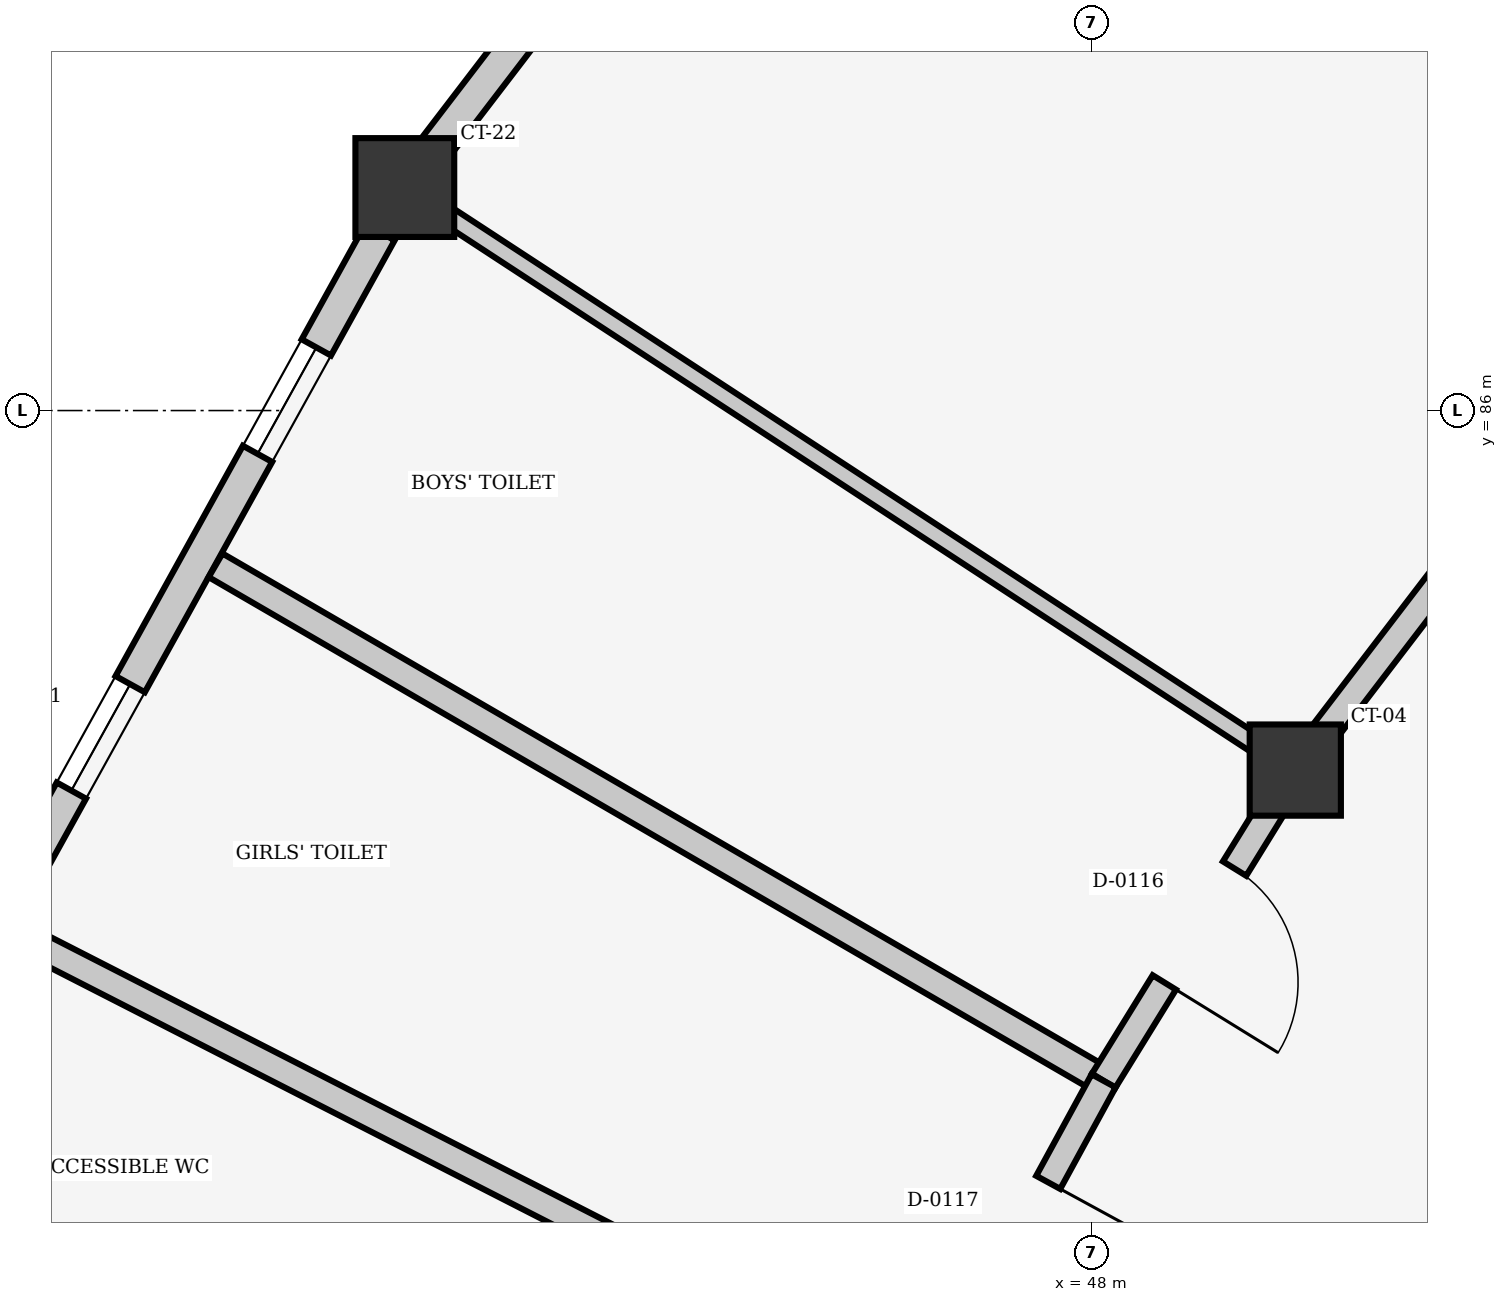
"""IFC4 building model, lengths in metres.
Left out: names, types, materials, properties, quantities, classifications, styles, units other than length and angle.
Written with IfcOpenShell. Run it as: python <this file> out.ifc"""

import sys

from ifc_helpers import new_model, si_unit, direction, frame, frame_2d, origin, origin_2d, place, context, subcontext, project, spatial, rectangle, extrude, element, fill, save


model = new_model("IFC4")
c1 = context("Model", 3, precision=1e-05, world=origin(), true_north=direction((0.0, 1.0)))
c2 = subcontext(c1, "Body", "Model", "MODEL_VIEW")
j1 = project(units=[si_unit("LENGTHUNIT", "METRE"), si_unit("PLANEANGLEUNIT", "RADIAN")], contexts=[c1])
p1 = place(None, origin())
s1 = spatial("IfcSite", under=j1, at=p1, CompositionType="ELEMENT")
p2 = place(p1, origin())
s2 = spatial("IfcBuilding", under=s1, at=p2, CompositionType="ELEMENT")
p3 = place(p2, origin())
s3 = spatial("IfcBuildingStorey", under=s2, at=p3, CompositionType="ELEMENT", Elevation=0.0)
p4 = place(p3, frame((49.342, 83.635, 0.0), z_axis=(0.0, 0.0, 1.0), x_axis=(-0.836840759551, 0.547446383817, 0.0)))
e1 = element("IfcColumn", 1, at=p4, inside=s3, PredefinedType="COLUMN", context=c2, shape_type="SweptSolid", body=[
    extrude(rectangle(XDim=0.6, YDim=0.6, at=origin_2d()), origin(), (0.0, 0.0, 1.0), 4.5),
])
p5 = place(p3, frame((43.484, 87.467, 0.0), z_axis=(0.0, 0.0, 1.0), x_axis=(-0.836840759551, 0.547446383817, 0.0)))
e2 = element("IfcColumn", 2, at=p5, inside=s3, PredefinedType="COLUMN", context=c2, shape_type="SweptSolid", body=[
    extrude(rectangle(XDim=0.65, YDim=0.65, at=origin_2d()), origin(), (0.0, 0.0, 1.0), 4.5),
])
p6 = place(p3, frame((43.688, 87.734, 0.0), z_axis=(0.0, 0.0, 1.0), x_axis=(0.60805685998, 0.793893478391, 0.0)))
e3 = element("IfcWall", 3, at=p6, inside=s3, PredefinedType="SOLIDWALL", context=c2, shape_type="SweptSolid", body=[
    extrude(rectangle(XDim=7.032, YDim=0.22, at=frame_2d((3.516, 0.0))), origin(), (0.0, 0.0, 1.0), 3.55),
])
p7 = place(p6, frame((0.956, 0.0, 0.85)))
e4 = element("IfcOpeningElement", 4, at=p7, cuts=e3, PredefinedType="OPENING", context=c2, shape_type="SweptSolid", body=[
    extrude(rectangle(XDim=0.9, YDim=1.4, at=frame_2d((0.45, 0.7))), frame((0.0, 0.12, 0.0), z_axis=(0.0, -1.0, 0.0), x_axis=(1.0, 0.0, 0.0)), (0.0, 0.0, 1.0), 0.24),
])
p8 = place(p6, frame((2.363, 0.0, 0.85)))
e5 = element("IfcOpeningElement", 5, at=p8, cuts=e3, PredefinedType="OPENING", context=c2, shape_type="SweptSolid", body=[
    extrude(rectangle(XDim=0.9, YDim=1.4, at=frame_2d((0.45, 0.7))), frame((0.0, 0.12, 0.0), z_axis=(0.0, -1.0, 0.0), x_axis=(1.0, 0.0, 0.0)), (0.0, 0.0, 1.0), 0.24),
])
p9 = place(p6, frame((3.769, 0.0, 0.85)))
e6 = element("IfcOpeningElement", 6, at=p9, cuts=e3, PredefinedType="OPENING", context=c2, shape_type="SweptSolid", body=[
    extrude(rectangle(XDim=0.9, YDim=1.4, at=frame_2d((0.45, 0.7))), frame((0.0, 0.12, 0.0), z_axis=(0.0, -1.0, 0.0), x_axis=(1.0, 0.0, 0.0)), (0.0, 0.0, 1.0), 0.24),
])
p10 = place(p6, frame((5.176, 0.0, 0.85)))
e7 = element("IfcOpeningElement", 7, at=p10, cuts=e3, PredefinedType="OPENING", context=c2, shape_type="SweptSolid", body=[
    extrude(rectangle(XDim=0.9, YDim=1.4, at=frame_2d((0.45, 0.7))), frame((0.0, 0.12, 0.0), z_axis=(0.0, -1.0, 0.0), x_axis=(1.0, 0.0, 0.0)), (0.0, 0.0, 1.0), 0.24),
])
p11 = place(p3, frame((39.919, 81.02, 0.0), z_axis=(0.0, 0.0, 1.0), x_axis=(0.483873000068, 0.87513822897, 0.0)))
e8 = element("IfcWall", 8, at=p11, inside=s3, PredefinedType="SOLIDWALL", context=c2, shape_type="SweptSolid", body=[
    extrude(rectangle(XDim=7.031, YDim=0.22, at=frame_2d((3.516, 0.0))), origin(), (0.0, 0.0, 1.0), 3.55),
])
p12 = place(p11, frame((0.584, 0.0, 1.15)))
e9 = element("IfcOpeningElement", 9, at=p12, cuts=e8, PredefinedType="OPENING", context=c2, shape_type="SweptSolid", body=[
    extrude(rectangle(XDim=0.8, YDim=1.1, at=frame_2d((0.4, 0.55))), frame((0.0, 0.12, 0.0), z_axis=(0.0, -1.0, 0.0), x_axis=(1.0, 0.0, 0.0)), (0.0, 0.0, 1.0), 0.24),
])
p13 = place(p11, frame((2.834, 0.0, 1.15)))
e10 = element("IfcOpeningElement", 10, at=p13, cuts=e8, PredefinedType="OPENING", context=c2, shape_type="SweptSolid", body=[
    extrude(rectangle(XDim=0.8, YDim=1.1, at=frame_2d((0.4, 0.55))), frame((0.0, 0.12, 0.0), z_axis=(0.0, -1.0, 0.0), x_axis=(1.0, 0.0, 0.0)), (0.0, 0.0, 1.0), 0.24),
])
p14 = place(p11, frame((5.365, 0.0, 1.15)))
e11 = element("IfcOpeningElement", 11, at=p14, cuts=e8, PredefinedType="OPENING", context=c2, shape_type="SweptSolid", body=[
    extrude(rectangle(XDim=0.8, YDim=1.1, at=frame_2d((0.4, 0.55))), frame((0.0, 0.12, 0.0), z_axis=(0.0, -1.0, 0.0), x_axis=(1.0, 0.0, 0.0)), (0.0, 0.0, 1.0), 0.24),
])
p15 = place(p3, frame((51.151, 82.063, 0.0), z_axis=(0.0, 0.0, 1.0), x_axis=(-0.483955379171, -0.875092675647, 0.0)))
e12 = element("IfcWall", 12, at=p15, inside=s3, PredefinedType="SOLIDWALL", context=c2, shape_type="SweptSolid", body=[
    extrude(rectangle(XDim=5.666, YDim=0.24, at=frame_2d((2.833, 0.0))), origin(), (0.0, 0.0, 1.0), 3.55),
])
p16 = place(p15, frame((1.758, 0.0, 0.9)))
e13 = element("IfcOpeningElement", 13, at=p16, cuts=e12, PredefinedType="OPENING", context=c2, shape_type="SweptSolid", body=[
    extrude(rectangle(XDim=2.15, YDim=1.25, at=frame_2d((1.075, 0.625))), frame((0.0, 0.13, 0.0), z_axis=(0.0, -1.0, 0.0), x_axis=(1.0, 0.0, 0.0)), (0.0, 0.0, 1.0), 0.26),
])
p17 = place(p3, frame((49.098, 83.795, 0.0), z_axis=(0.0, 0.0, 1.0), x_axis=(-0.836919139192, 0.547326551935, 0.0)))
e14 = element("IfcWall", 14, at=p17, inside=s3, PredefinedType="PARTITIONING", context=c2, shape_type="SweptSolid", body=[
    extrude(rectangle(XDim=6.391, YDim=0.12, at=frame_2d((3.196, 0.0))), origin(), (0.0, 0.0, 1.0), 3.572),
])
p18 = place(p3, frame((45.851, 77.923, 0.0), z_axis=(0.0, 0.0, 1.0), x_axis=(-0.908513073448, 0.41785642914, 0.0)))
e15 = element("IfcWall", 15, at=p18, inside=s3, PredefinedType="PARTITIONING", context=c2, shape_type="SweptSolid", body=[
    extrude(rectangle(XDim=6.392, YDim=0.16, at=frame_2d((3.196, 0.0))), origin(), (0.0, 0.0, 1.0), 3.572),
])
p19 = place(p3, frame((48.081, 81.591, 0.0), z_axis=(0.0, 0.0, 1.0), x_axis=(-0.864871459639, 0.501993384719, 0.0)))
e16 = element("IfcWall", 16, at=p19, inside=s3, PredefinedType="PARTITIONING", context=c2, shape_type="SweptSolid", body=[
    extrude(rectangle(XDim=6.755, YDim=0.18, at=frame_2d((3.377, 0.0))), origin(), (0.0, 0.0, 1.0), 3.572),
])
p20 = place(p3, frame((46.931, 79.482, 0.0), z_axis=(0.0, 0.0, 1.0), x_axis=(-0.890396362977, 0.455186024387, 0.0)))
e17 = element("IfcWall", 17, at=p20, inside=s3, PredefinedType="PARTITIONING", context=c2, shape_type="SweptSolid", body=[
    extrude(rectangle(XDim=6.771, YDim=0.18, at=frame_2d((3.385, 0.0))), origin(), (0.0, 0.0, 1.0), 3.572),
])
p21 = place(p3, frame((53.217, 88.696, 0.0), z_axis=(0.0, 0.0, 1.0), x_axis=(-0.607883612756, -0.794026141473, 0.0)))
e18 = element("IfcWall", 18, at=p21, inside=s3, PredefinedType="PARTITIONING", context=c2, shape_type="SweptSolid", body=[
    extrude(rectangle(XDim=6.082, YDim=0.18, at=frame_2d((3.041, 0.0))), origin(), (0.0, 0.0, 1.0), 3.572),
])
p22 = place(p21, frame((2.416, 0.0, 0.0)))
e19 = element("IfcOpeningElement", 19, at=p22, cuts=e18, PredefinedType="OPENING", context=c2, shape_type="SweptSolid", body=[
    extrude(rectangle(XDim=1.25, YDim=2.2, at=frame_2d((0.625, 1.1))), frame((0.0, 0.1, 0.0), z_axis=(0.0, -1.0, 0.0), x_axis=(1.0, 0.0, 0.0)), (0.0, 0.0, 1.0), 0.2),
])
p23 = place(p3, frame((49.189, 83.386, 0.0), z_axis=(0.0, 0.0, 1.0), x_axis=(-0.525246440568, -0.850950161097, 0.0)))
e20 = element("IfcWall", 20, at=p23, inside=s3, PredefinedType="PARTITIONING", context=c2, shape_type="SweptSolid", body=[
    extrude(rectangle(XDim=2.109, YDim=0.18, at=frame_2d((1.055, 0.0))), origin(), (0.0, 0.0, 1.0), 3.572),
])
p24 = place(p23, frame((0.469, 0.0, 0.0)))
e21 = element("IfcOpeningElement", 21, at=p24, cuts=e20, PredefinedType="OPENING", context=c2, shape_type="SweptSolid", body=[
    extrude(rectangle(XDim=0.88, YDim=2.1, at=frame_2d((0.44, 1.05))), frame((0.0, 0.1, 0.0), z_axis=(0.0, -1.0, 0.0), x_axis=(1.0, 0.0, 0.0)), (0.0, 0.0, 1.0), 0.2),
])
p25 = place(p3, frame((48.081, 81.591, 0.0), z_axis=(0.0, 0.0, 1.0), x_axis=(-0.478759564311, -0.87794605733, 0.0)))
e22 = element("IfcWall", 22, at=p25, inside=s3, PredefinedType="PARTITIONING", context=c2, shape_type="SweptSolid", body=[
    extrude(rectangle(XDim=2.402, YDim=0.18, at=frame_2d((1.201, 0.0))), origin(), (0.0, 0.0, 1.0), 3.572),
])
p26 = place(p25, frame((0.761, 0.0, 0.0)))
e23 = element("IfcOpeningElement", 23, at=p26, cuts=e22, PredefinedType="OPENING", context=c2, shape_type="SweptSolid", body=[
    extrude(rectangle(XDim=0.88, YDim=2.1, at=frame_2d((0.44, 1.05))), frame((0.0, 0.1, 0.0), z_axis=(0.0, -1.0, 0.0), x_axis=(1.0, 0.0, 0.0)), (0.0, 0.0, 1.0), 0.2),
])
p27 = place(p13, origin())
e24 = element("IfcWindow", 24, at=p27, inside=s3, PartitioningType="SINGLE_PANEL", PredefinedType="WINDOW", context=c2, shape_type="SweptSolid", body=[
    extrude(rectangle(XDim=0.8, YDim=1.1, at=frame_2d((0.4, 0.55))), frame((0.0, 0.03, 0.0), z_axis=(0.0, -1.0, 0.0), x_axis=(1.0, 0.0, 0.0)), (0.0, 0.0, 1.0), 0.06),
])
fill(e10, e24)
p28 = place(p14, origin())
e25 = element("IfcWindow", 25, at=p28, inside=s3, PartitioningType="SINGLE_PANEL", PredefinedType="WINDOW", context=c2, shape_type="SweptSolid", body=[
    extrude(rectangle(XDim=0.8, YDim=1.1, at=frame_2d((0.4, 0.55))), frame((0.0, 0.03, 0.0), z_axis=(0.0, -1.0, 0.0), x_axis=(1.0, 0.0, 0.0)), (0.0, 0.0, 1.0), 0.06),
])
fill(e11, e25)
p29 = place(p24, origin())
e26 = element("IfcDoor", 26, at=p29, inside=s3, OperationType="SINGLE_SWING_RIGHT", PredefinedType="DOOR", context=c2, shape_type="SweptSolid", body=[
    extrude(rectangle(XDim=0.88, YDim=2.1, at=frame_2d((0.44, 1.05))), frame((0.0, 0.025, 0.0), z_axis=(0.0, -1.0, 0.0), x_axis=(1.0, 0.0, 0.0)), (0.0, 0.0, 1.0), 0.05),
])
fill(e21, e26)
p30 = place(p26, origin())
e27 = element("IfcDoor", 27, at=p30, inside=s3, OperationType="SINGLE_SWING_LEFT", PredefinedType="DOOR", context=c2, shape_type="SweptSolid", body=[
    extrude(rectangle(XDim=0.88, YDim=2.1, at=frame_2d((0.44, 1.05))), frame((0.0, 0.025, 0.0), z_axis=(0.0, -1.0, 0.0), x_axis=(1.0, 0.0, 0.0)), (0.0, 0.0, 1.0), 0.05),
])
fill(e23, e27)
save(model, sys.argv[1])
